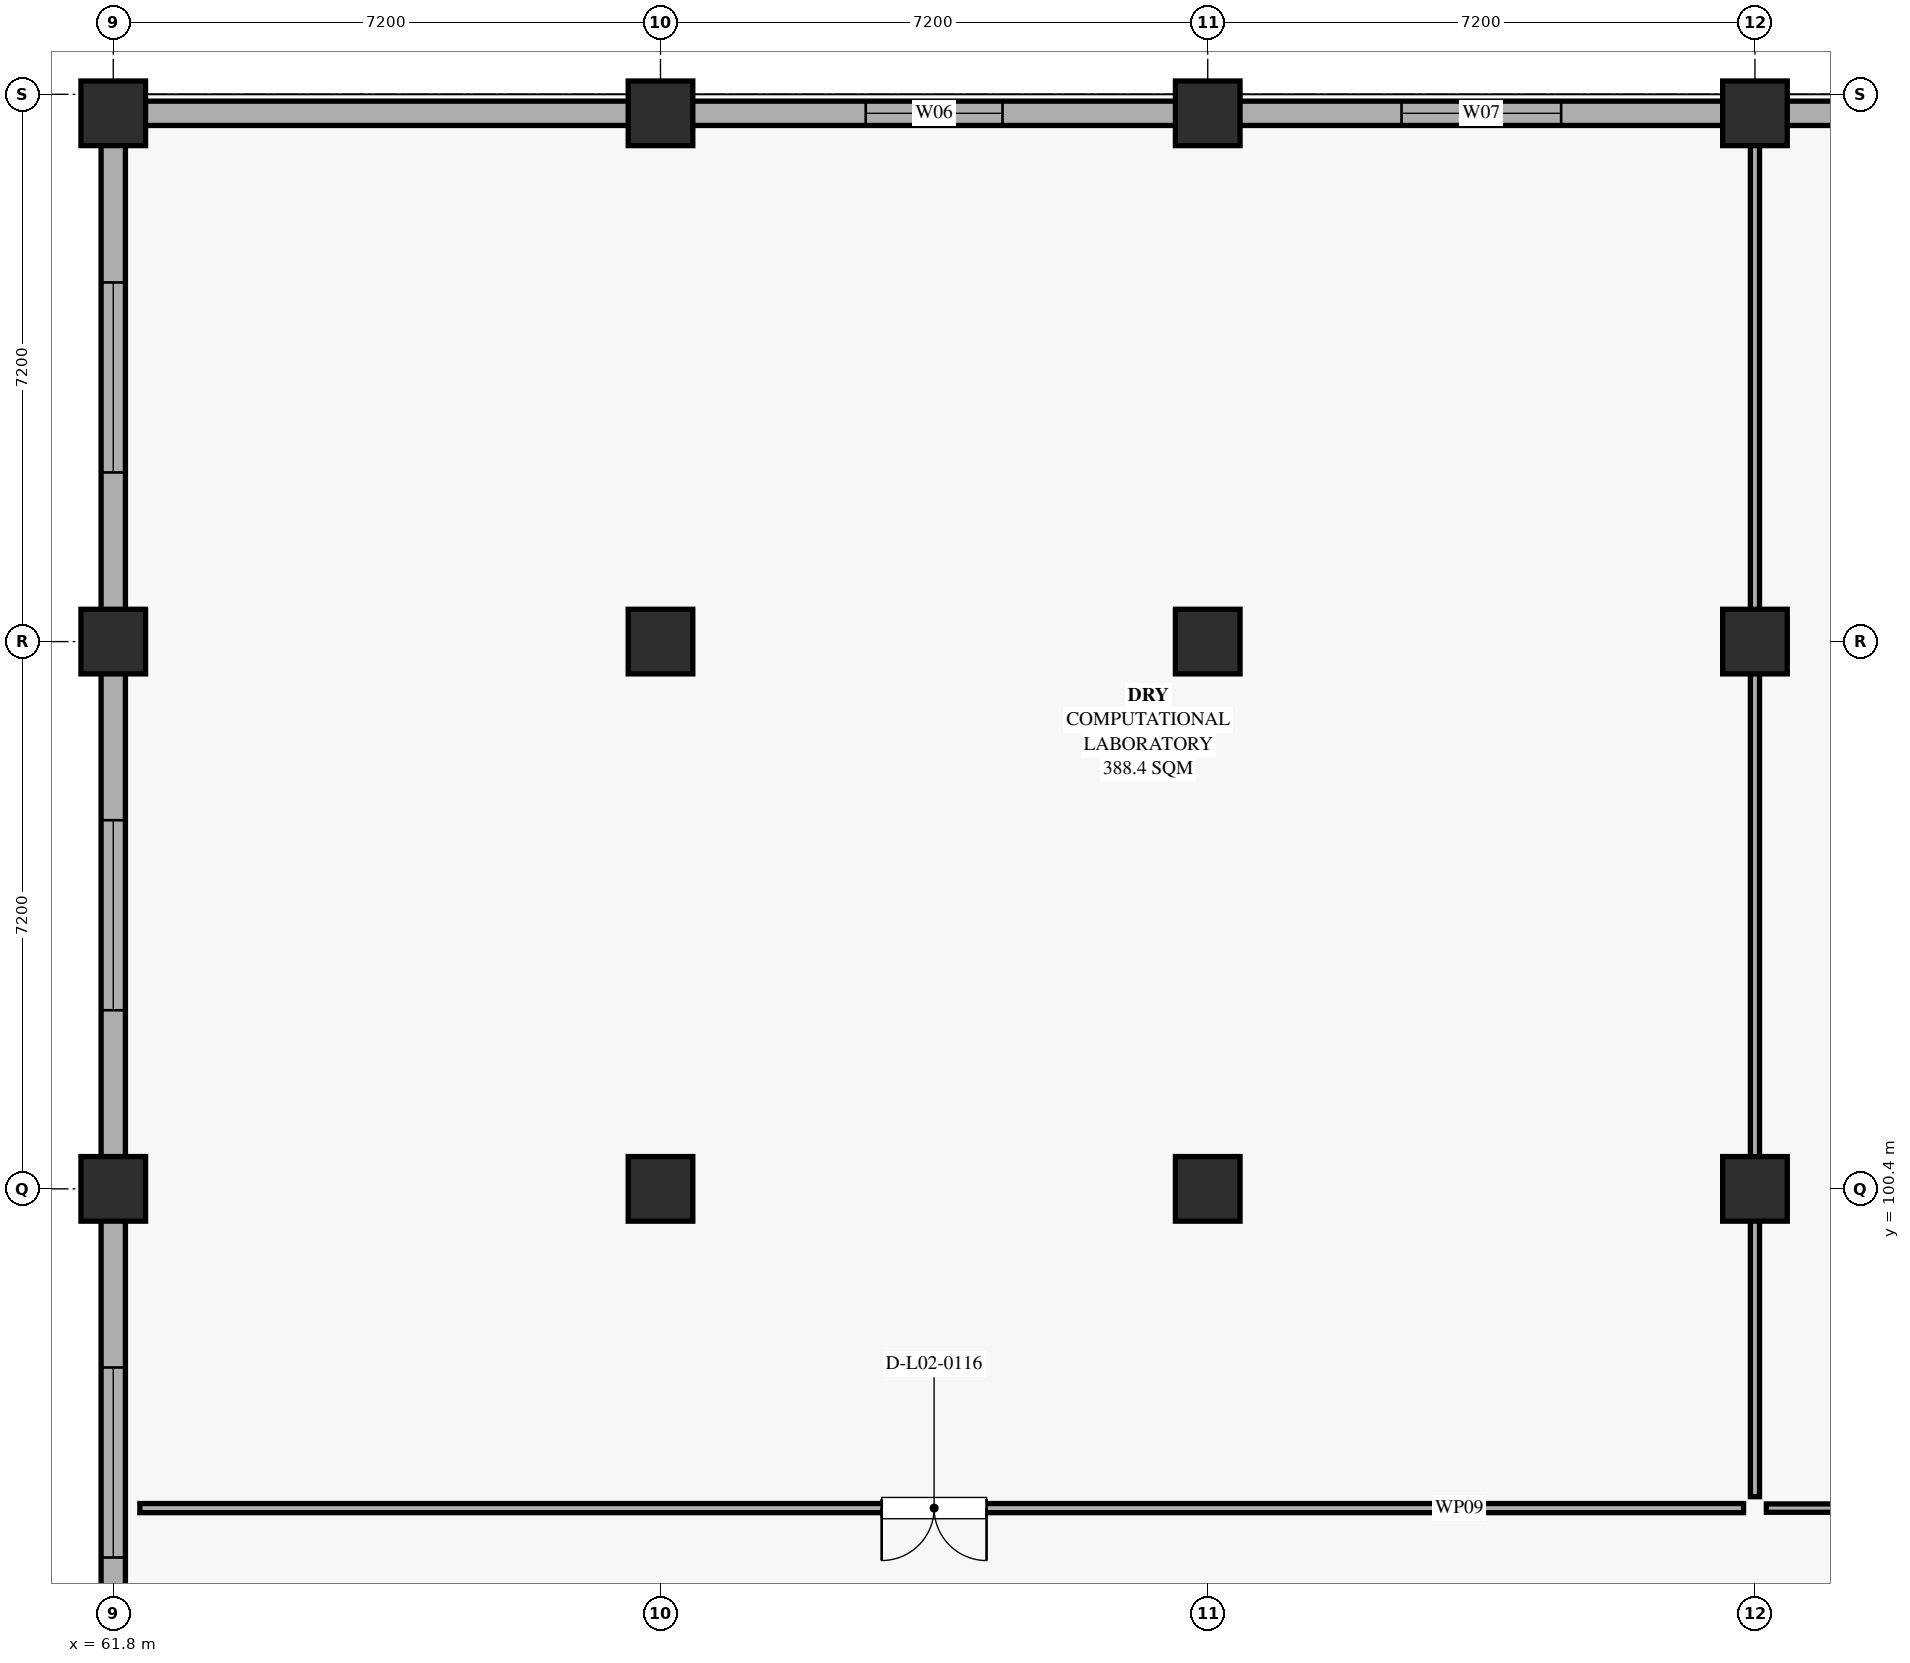
"""IFC4 building model, lengths in metres.
Left out: names, types, materials, properties, quantities, classifications, styles, units other than length and angle.
Written with IfcOpenShell. Run it as: python <this file> out.ifc"""

import sys

from ifc_helpers import new_model, si_unit, direction, frame, frame_2d, origin, origin_2d, place, context, subcontext, project, spatial, rectangle, extrude, element, fill, save


model = new_model("IFC4")
c1 = context("Model", 3, precision=1e-05, world=origin(), true_north=direction((0.0, 1.0)))
c2 = subcontext(c1, "Body", "Model", "MODEL_VIEW")
j1 = project(units=[si_unit("LENGTHUNIT", "METRE"), si_unit("PLANEANGLEUNIT", "RADIAN")], contexts=[c1])
p1 = place(None, origin())
s1 = spatial("IfcSite", under=j1, at=p1, CompositionType="ELEMENT")
p2 = place(p1, origin())
s2 = spatial("IfcBuilding", under=s1, at=p2, CompositionType="ELEMENT")
p3 = place(p2, frame((0.0, 0.0, 10.44)))
s3 = spatial("IfcBuildingStorey", under=s2, at=p3, CompositionType="ELEMENT", Elevation=10.44)
for number, where, z_axis, x_axis in (
    (1, (61.8, 100.4, 0.0), (0.0, 0.0, 1.0), (1.0, 0.0, 0.0)),
    (2, (69.0, 100.4, 0.0), (0.0, 0.0, 1.0), (1.0, 0.0, 0.0)),
    (3, (76.2, 100.4, 0.0), (0.0, 0.0, 1.0), (1.0, 0.0, 0.0)),
    (4, (83.4, 100.4, 0.0), (0.0, 0.0, 1.0), (1.0, 0.0, 0.0)),
    (5, (61.8, 107.6, 0.0), (0.0, 0.0, 1.0), (1.0, 0.0, 0.0)),
    (6, (69.0, 107.6, 0.0), (0.0, 0.0, 1.0), (1.0, 0.0, 0.0)),
    (7, (76.2, 107.6, 0.0), (0.0, 0.0, 1.0), (1.0, 0.0, 0.0)),
    (8, (83.4, 107.6, 0.0), (0.0, 0.0, 1.0), (1.0, 0.0, 0.0)),
    (9, (61.8, 114.55, 0.0), (0.0, 0.0, 1.0), (1.0, 0.0, 0.0)),
    (10, (69.0, 114.55, 0.0), (0.0, 0.0, 1.0), (1.0, 0.0, 0.0)),
    (11, (76.2, 114.55, 0.0), (0.0, 0.0, 1.0), (1.0, 0.0, 0.0)),
    (12, (83.4, 114.55, 0.0), (0.0, 0.0, 1.0), (1.0, 0.0, 0.0)),
):
    element("IfcColumn", number, at=place(p3, frame(where, z_axis=z_axis, x_axis=x_axis)), inside=s3, PredefinedType="COLUMN", context=c2, shape_type="SweptSolid", body=[
        extrude(rectangle(XDim=0.85, YDim=0.85, at=origin_2d()), origin(), (0.0, 0.0, 1.0), 4.68),
    ])
p4 = place(p3, frame((61.8, 93.61, 0.0), z_axis=(0.0, 0.0, 1.0), x_axis=(0.0, 1.0, 0.0)))
e13 = element("IfcWall", 13, at=p4, inside=s3, PredefinedType="SOLIDWALL", context=c2, shape_type="SweptSolid", body=[
    extrude(rectangle(XDim=6.38, YDim=0.32, at=frame_2d((3.19, 0.0))), origin(), (0.0, 0.0, 1.0), 3.18),
])
p5 = place(p4, frame((1.94, 0.0, 0.85)))
e14 = element("IfcOpeningElement", 14, at=p5, cuts=e13, PredefinedType="OPENING", context=c2, shape_type="SweptSolid", body=[
    extrude(rectangle(XDim=2.5, YDim=2.2, at=frame_2d((1.25, 1.1))), frame((0.0, 0.17, 0.0), z_axis=(0.0, -1.0, 0.0), x_axis=(1.0, 0.0, 0.0)), (0.0, 0.0, 1.0), 0.34),
])
p6 = place(p3, frame((61.8, 100.81, 0.0), z_axis=(0.0, 0.0, 1.0), x_axis=(0.0, 1.0, 0.0)))
e15 = element("IfcWall", 15, at=p6, inside=s3, PredefinedType="SOLIDWALL", context=c2, shape_type="SweptSolid", body=[
    extrude(rectangle(XDim=6.38, YDim=0.32, at=frame_2d((3.19, 0.0))), origin(), (0.0, 0.0, 1.0), 3.18),
])
p7 = place(p6, frame((1.94, 0.0, 0.85)))
e16 = element("IfcOpeningElement", 16, at=p7, cuts=e15, PredefinedType="OPENING", context=c2, shape_type="SweptSolid", body=[
    extrude(rectangle(XDim=2.5, YDim=2.2, at=frame_2d((1.25, 1.1))), frame((0.0, 0.17, 0.0), z_axis=(0.0, -1.0, 0.0), x_axis=(1.0, 0.0, 0.0)), (0.0, 0.0, 1.0), 0.34),
])
p8 = place(p3, frame((61.8, 108.01, 0.0), z_axis=(0.0, 0.0, 1.0), x_axis=(0.0, 1.0, 0.0)))
e17 = element("IfcWall", 17, at=p8, inside=s3, PredefinedType="SOLIDWALL", context=c2, shape_type="SweptSolid", body=[
    extrude(rectangle(XDim=6.13, YDim=0.32, at=frame_2d((3.065, 0.0))), origin(), (0.0, 0.0, 1.0), 3.18),
])
p9 = place(p8, frame((1.815, 0.0, 0.85)))
e18 = element("IfcOpeningElement", 18, at=p9, cuts=e17, PredefinedType="OPENING", context=c2, shape_type="SweptSolid", body=[
    extrude(rectangle(XDim=2.5, YDim=2.2, at=frame_2d((1.25, 1.1))), frame((0.0, 0.17, 0.0), z_axis=(0.0, -1.0, 0.0), x_axis=(1.0, 0.0, 0.0)), (0.0, 0.0, 1.0), 0.34),
])
p10 = place(p3, frame((62.21, 114.55, 0.0), z_axis=(0.0, 0.0, 1.0), x_axis=(1.0, 0.0, 0.0)))
e19 = element("IfcWall", 19, at=p10, inside=s3, PredefinedType="SOLIDWALL", context=c2, shape_type="SweptSolid", body=[
    extrude(rectangle(XDim=6.38, YDim=0.32, at=frame_2d((3.19, 0.0))), origin(), (0.0, 0.0, 1.0), 3.18),
])
p11 = place(p3, frame((69.41, 114.55, 0.0), z_axis=(0.0, 0.0, 1.0), x_axis=(1.0, 0.0, 0.0)))
e20 = element("IfcWall", 20, at=p11, inside=s3, PredefinedType="SOLIDWALL", context=c2, shape_type="SweptSolid", body=[
    extrude(rectangle(XDim=6.38, YDim=0.32, at=frame_2d((3.19, 0.0))), origin(), (0.0, 0.0, 1.0), 3.18),
])
p12 = place(p11, frame((2.29, 0.0, 0.85)))
e21 = element("IfcOpeningElement", 21, at=p12, cuts=e20, PredefinedType="OPENING", context=c2, shape_type="SweptSolid", body=[
    extrude(rectangle(XDim=1.8, YDim=2.1, at=frame_2d((0.9, 1.05))), frame((0.0, 0.17, 0.0), z_axis=(0.0, -1.0, 0.0), x_axis=(1.0, 0.0, 0.0)), (0.0, 0.0, 1.0), 0.34),
])
p13 = place(p3, frame((76.61, 114.55, 0.0), z_axis=(0.0, 0.0, 1.0), x_axis=(1.0, 0.0, 0.0)))
e22 = element("IfcWall", 22, at=p13, inside=s3, PredefinedType="SOLIDWALL", context=c2, shape_type="SweptSolid", body=[
    extrude(rectangle(XDim=6.38, YDim=0.32, at=frame_2d((3.19, 0.0))), origin(), (0.0, 0.0, 1.0), 3.18),
])
p14 = place(p13, frame((2.14, 0.0, 0.85)))
e23 = element("IfcOpeningElement", 23, at=p14, cuts=e22, PredefinedType="OPENING", context=c2, shape_type="SweptSolid", body=[
    extrude(rectangle(XDim=2.1, YDim=2.1, at=frame_2d((1.05, 1.05))), frame((0.0, 0.17, 0.0), z_axis=(0.0, -1.0, 0.0), x_axis=(1.0, 0.0, 0.0)), (0.0, 0.0, 1.0), 0.34),
])
p15 = place(p3, frame((83.81, 114.55, 0.0), z_axis=(0.0, 0.0, 1.0), x_axis=(1.0, 0.0, 0.0)))
e24 = element("IfcWall", 24, at=p15, inside=s3, PredefinedType="SOLIDWALL", context=c2, shape_type="SweptSolid", body=[
    extrude(rectangle(XDim=6.38, YDim=0.32, at=frame_2d((3.19, 0.0))), origin(), (0.0, 0.0, 1.0), 3.18),
])
p16 = place(p15, frame((1.99, 0.0, 0.85)))
e25 = element("IfcOpeningElement", 25, at=p16, cuts=e24, PredefinedType="OPENING", context=c2, shape_type="SweptSolid", body=[
    extrude(rectangle(XDim=2.4, YDim=2.1, at=frame_2d((1.2, 1.05))), frame((0.0, 0.17, 0.0), z_axis=(0.0, -1.0, 0.0), x_axis=(1.0, 0.0, 0.0)), (0.0, 0.0, 1.0), 0.34),
])
p17 = place(p3, frame((83.25, 96.2, 0.0), z_axis=(0.0, 0.0, 1.0), x_axis=(-1.0, 0.0, 0.0)))
e26 = element("IfcWall", 26, at=p17, inside=s3, PredefinedType="PARTITIONING", context=c2, shape_type="SweptSolid", body=[
    extrude(rectangle(XDim=21.1, YDim=0.12, at=frame_2d((10.55, 0.0))), origin(), (0.0, 0.0, 1.0), 3.16),
])
p18 = place(p17, frame((9.96, 0.0, 0.0)))
e27 = element("IfcOpeningElement", 27, at=p18, cuts=e26, PredefinedType="OPENING", context=c2, shape_type="SweptSolid", body=[
    extrude(rectangle(XDim=1.38, YDim=2.22, at=frame_2d((0.69, 1.11))), frame((0.0, 0.07, 0.0), z_axis=(0.0, -1.0, 0.0), x_axis=(1.0, 0.0, 0.0)), (0.0, 0.0, 1.0), 0.14),
])
p19 = place(p3, frame((83.4, 114.2, 0.0), z_axis=(0.0, 0.0, 1.0), x_axis=(0.0, -1.0, 0.0)))
e28 = element("IfcWall", 28, at=p19, inside=s3, PredefinedType="PARTITIONING", context=c2, shape_type="SweptSolid", body=[
    extrude(rectangle(XDim=17.85, YDim=0.12, at=frame_2d((8.925, 0.0))), origin(), (0.0, 0.0, 1.0), 3.16),
])
p20 = place(p3, frame((111.85, 96.2, 0.0), z_axis=(0.0, 0.0, 1.0), x_axis=(-1.0, 0.0, 0.0)))
e29 = element("IfcWall", 29, at=p20, inside=s3, PredefinedType="PARTITIONING", context=c2, shape_type="SweptSolid", body=[
    extrude(rectangle(XDim=28.3, YDim=0.11, at=frame_2d((14.15, 0.0))), origin(), (0.0, 0.0, 1.0), 3.16),
])
p21 = place(p20, frame((9.73, 0.0, 0.0)))
e30 = element("IfcOpeningElement", 30, at=p21, cuts=e29, PredefinedType="OPENING", context=c2, shape_type="SweptSolid", body=[
    extrude(rectangle(XDim=1.44, YDim=2.05, at=frame_2d((0.72, 1.025))), frame((0.0, 0.065, 0.0), z_axis=(0.0, -1.0, 0.0), x_axis=(1.0, 0.0, 0.0)), (0.0, 0.0, 1.0), 0.13),
])
p22 = place(p5, origin())
e31 = element("IfcWindow", 31, at=p22, inside=s3, PartitioningType="DOUBLE_PANEL_VERTICAL", PredefinedType="WINDOW", context=c2, shape_type="SweptSolid", body=[
    extrude(rectangle(XDim=2.5, YDim=2.2, at=frame_2d((1.25, 1.1))), frame((0.0, 0.03, 0.0), z_axis=(0.0, -1.0, 0.0), x_axis=(1.0, 0.0, 0.0)), (0.0, 0.0, 1.0), 0.06),
])
fill(e14, e31)
p23 = place(p7, origin())
e32 = element("IfcWindow", 32, at=p23, inside=s3, PartitioningType="DOUBLE_PANEL_VERTICAL", PredefinedType="WINDOW", context=c2, shape_type="SweptSolid", body=[
    extrude(rectangle(XDim=2.5, YDim=2.2, at=frame_2d((1.25, 1.1))), frame((0.0, 0.03, 0.0), z_axis=(0.0, -1.0, 0.0), x_axis=(1.0, 0.0, 0.0)), (0.0, 0.0, 1.0), 0.06),
])
fill(e16, e32)
p24 = place(p9, origin())
e33 = element("IfcWindow", 33, at=p24, inside=s3, PartitioningType="DOUBLE_PANEL_VERTICAL", PredefinedType="WINDOW", context=c2, shape_type="SweptSolid", body=[
    extrude(rectangle(XDim=2.5, YDim=2.2, at=frame_2d((1.25, 1.1))), frame((0.0, 0.03, 0.0), z_axis=(0.0, -1.0, 0.0), x_axis=(1.0, 0.0, 0.0)), (0.0, 0.0, 1.0), 0.06),
])
fill(e18, e33)
p25 = place(p12, origin())
e34 = element("IfcWindow", 34, at=p25, inside=s3, PartitioningType="DOUBLE_PANEL_VERTICAL", PredefinedType="WINDOW", context=c2, shape_type="SweptSolid", body=[
    extrude(rectangle(XDim=1.8, YDim=2.1, at=frame_2d((0.9, 1.05))), frame((0.0, 0.03, 0.0), z_axis=(0.0, -1.0, 0.0), x_axis=(1.0, 0.0, 0.0)), (0.0, 0.0, 1.0), 0.06),
])
fill(e21, e34)
p26 = place(p14, origin())
e35 = element("IfcWindow", 35, at=p26, inside=s3, PartitioningType="DOUBLE_PANEL_VERTICAL", PredefinedType="WINDOW", context=c2, shape_type="SweptSolid", body=[
    extrude(rectangle(XDim=2.1, YDim=2.1, at=frame_2d((1.05, 1.05))), frame((0.0, 0.03, 0.0), z_axis=(0.0, -1.0, 0.0), x_axis=(1.0, 0.0, 0.0)), (0.0, 0.0, 1.0), 0.06),
])
fill(e23, e35)
p27 = place(p18, origin())
e36 = element("IfcDoor", 36, at=p27, inside=s3, OperationType="DOUBLE_DOOR_SINGLE_SWING", PredefinedType="DOOR", context=c2, shape_type="SweptSolid", body=[
    extrude(rectangle(XDim=1.38, YDim=2.22, at=frame_2d((0.69, 1.11))), frame((0.0, 0.025, 0.0), z_axis=(0.0, -1.0, 0.0), x_axis=(1.0, 0.0, 0.0)), (0.0, 0.0, 1.0), 0.05),
])
fill(e27, e36)
save(model, sys.argv[1])
